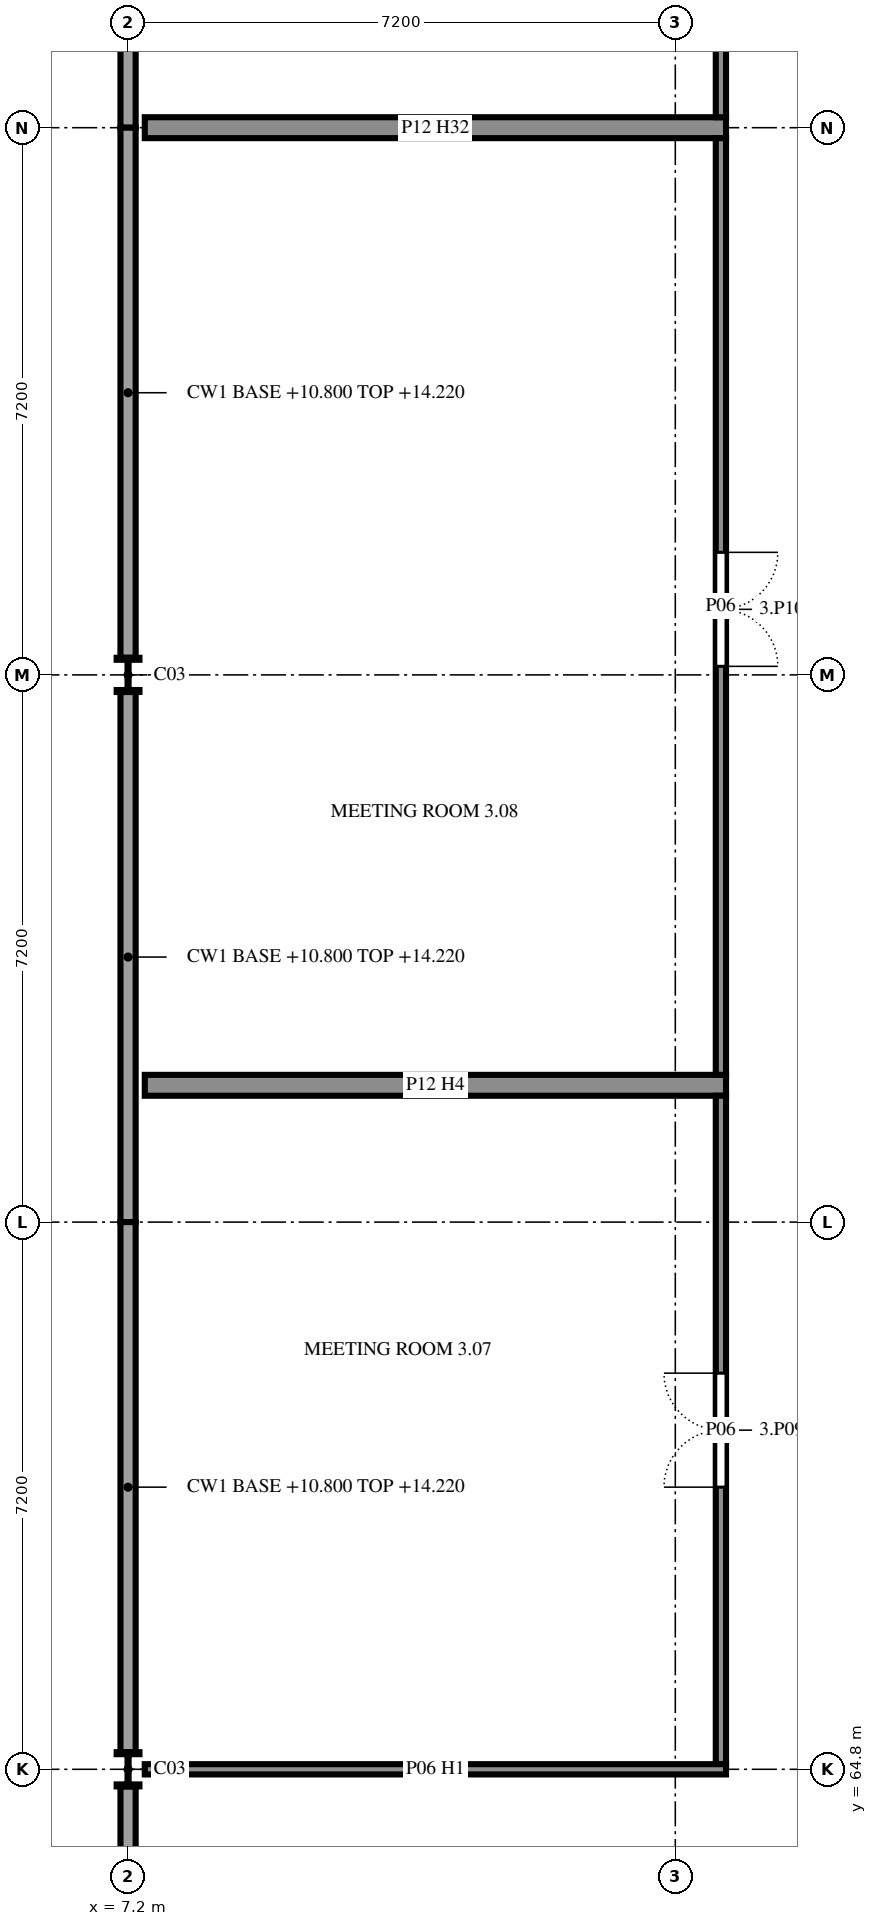
"""IFC4 building model, lengths in metres.
Left out: names, types, materials, properties, quantities, classifications, styles, units other than length and angle.
Written with IfcOpenShell. Run it as: python <this file> out.ifc"""

import sys

from ifc_helpers import new_model, si_unit, direction, frame, frame_2d, origin, origin_2d, place, context, subcontext, project, spatial, rectangle, i_section, extrude, element, fill, save


model = new_model("IFC4")
c1 = context("Model", 3, precision=1e-05, world=origin(), true_north=direction((0.0, 1.0)))
c2 = subcontext(c1, "Body", "Model", "MODEL_VIEW")
j1 = project(units=[si_unit("LENGTHUNIT", "METRE"), si_unit("PLANEANGLEUNIT", "RADIAN")], contexts=[c1])
p1 = place(None, origin())
s1 = spatial("IfcSite", under=j1, at=p1, CompositionType="ELEMENT")
p2 = place(p1, origin())
s2 = spatial("IfcBuilding", under=s1, at=p2, CompositionType="ELEMENT")
p3 = place(p2, frame((0.0, 0.0, 10.8)))
s3 = spatial("IfcBuildingStorey", under=s2, at=p3, CompositionType="ELEMENT", Elevation=10.8)
for number, where, z_axis, x_axis in (
    (1, (7.2, 64.8, 0.0), (0.0, 0.0, 1.0), (1.0, 0.0, 0.0)),
    (2, (7.2, 79.2, 0.0), (0.0, 0.0, 1.0), (1.0, 0.0, 0.0)),
):
    element("IfcColumn", number, at=place(p3, frame(where, z_axis=z_axis, x_axis=x_axis)), inside=s3, PredefinedType="COLUMN", context=c2, shape_type="SweptSolid", body=[
        extrude(i_section(OverallWidth=0.3, OverallDepth=0.45, WebThickness=0.014, FlangeThickness=0.026, FilletRadius=0.027, at=origin_2d()), origin(), (0.0, 0.0, 1.0), 3.6),
    ])
p4 = place(p3, frame((7.42, 73.8, 0.0), z_axis=(0.0, 0.0, 1.0), x_axis=(1.0, 0.0, 0.0)))
e3 = element("IfcWall", 3, at=p4, inside=s3, PredefinedType="PARTITIONING", context=c2, shape_type="SweptSolid", body=[
    extrude(rectangle(XDim=7.647, YDim=0.275, at=frame_2d((3.824, 0.0))), origin(), (0.0, 0.0, 1.0), 3.42),
])
p5 = place(p3, frame((15.0, 73.663, 0.0), z_axis=(0.0, 0.0, 1.0), x_axis=(0.0, -1.0, 0.0)))
e4 = element("IfcWall", 4, at=p5, inside=s3, PredefinedType="PARTITIONING", context=c2, shape_type="SweptSolid", body=[
    extrude(rectangle(XDim=8.795, YDim=0.135, at=frame_2d((4.397, 0.0))), origin(), (0.0, 0.0, 1.0), 3.42),
])
p6 = place(p5, frame((3.65, 0.0, 0.0)))
e5 = element("IfcOpeningElement", 5, at=p6, cuts=e4, PredefinedType="OPENING", context=c2, shape_type="SweptSolid", body=[
    extrude(rectangle(XDim=1.5, YDim=2.1, at=frame_2d((0.75, 1.05))), frame((0.0, 0.077, 0.0), z_axis=(0.0, -1.0, 0.0), x_axis=(1.0, 0.0, 0.0)), (0.0, 0.0, 1.0), 0.155),
])
p7 = place(p3, frame((15.067, 64.8, 0.0), z_axis=(0.0, 0.0, 1.0), x_axis=(-1.0, 0.0, 0.0)))
e6 = element("IfcWall", 6, at=p7, inside=s3, PredefinedType="PARTITIONING", context=c2, shape_type="SweptSolid", body=[
    extrude(rectangle(XDim=7.647, YDim=0.135, at=frame_2d((3.824, 0.0))), origin(), (0.0, 0.0, 1.0), 2.82),
])
p8 = place(p3, frame((7.42, 86.4, 0.0), z_axis=(0.0, 0.0, 1.0), x_axis=(1.0, 0.0, 0.0)))
e7 = element("IfcWall", 7, at=p8, inside=s3, PredefinedType="PARTITIONING", context=c2, shape_type="SweptSolid", body=[
    extrude(rectangle(XDim=7.647, YDim=0.275, at=frame_2d((3.824, 0.0))), origin(), (0.0, 0.0, 1.0), 2.97),
])
p9 = place(p3, frame((15.0, 86.262, 0.0), z_axis=(0.0, 0.0, 1.0), x_axis=(0.0, -1.0, 0.0)))
e8 = element("IfcWall", 8, at=p9, inside=s3, PredefinedType="PARTITIONING", context=c2, shape_type="SweptSolid", body=[
    extrude(rectangle(XDim=12.325, YDim=0.135, at=frame_2d((6.163, 0.0))), origin(), (0.0, 0.0, 1.0), 3.42),
])
p10 = place(p9, frame((5.45, 0.0, 0.0)))
e9 = element("IfcOpeningElement", 9, at=p10, cuts=e8, PredefinedType="OPENING", context=c2, shape_type="SweptSolid", body=[
    extrude(rectangle(XDim=1.5, YDim=2.1, at=frame_2d((0.75, 1.05))), frame((0.0, 0.077, 0.0), z_axis=(0.0, -1.0, 0.0), x_axis=(1.0, 0.0, 0.0)), (0.0, 0.0, 1.0), 0.155),
])
p11 = place(p3, frame((15.0, 98.863, 0.0), z_axis=(0.0, 0.0, 1.0), x_axis=(0.0, -1.0, 0.0)))
e10 = element("IfcWall", 10, at=p11, inside=s3, PredefinedType="PARTITIONING", context=c2, shape_type="SweptSolid", body=[
    extrude(rectangle(XDim=12.325, YDim=0.135, at=frame_2d((6.163, 0.0))), origin(), (0.0, 0.0, 1.0), 3.42),
])
p12 = place(p11, frame((5.45, 0.0, 0.0)))
e11 = element("IfcOpeningElement", 11, at=p12, cuts=e10, PredefinedType="OPENING", context=c2, shape_type="SweptSolid", body=[
    extrude(rectangle(XDim=1.5, YDim=2.1, at=frame_2d((0.75, 1.05))), frame((0.0, 0.077, 0.0), z_axis=(0.0, -1.0, 0.0), x_axis=(1.0, 0.0, 0.0)), (0.0, 0.0, 1.0), 0.155),
])
p13 = place(p6, frame((1.5, 0.0, 0.0), z_axis=(0.0, 0.0, 1.0), x_axis=(-1.0, 0.0, 0.0)))
e12 = element("IfcDoor", 12, at=p13, inside=s3, OperationType="DOUBLE_DOOR_SINGLE_SWING", PredefinedType="DOOR", context=c2, shape_type="SweptSolid", body=[
    extrude(rectangle(XDim=1.5, YDim=2.1, at=frame_2d((0.75, 1.05))), frame((0.0, 0.025, 0.0), z_axis=(0.0, -1.0, 0.0), x_axis=(1.0, 0.0, 0.0)), (0.0, 0.0, 1.0), 0.05),
])
fill(e5, e12)
p14 = place(p10, origin())
e13 = element("IfcDoor", 13, at=p14, inside=s3, OperationType="DOUBLE_DOOR_SINGLE_SWING", PredefinedType="DOOR", context=c2, shape_type="SweptSolid", body=[
    extrude(rectangle(XDim=1.5, YDim=2.1, at=frame_2d((0.75, 1.05))), frame((0.0, 0.025, 0.0), z_axis=(0.0, -1.0, 0.0), x_axis=(1.0, 0.0, 0.0)), (0.0, 0.0, 1.0), 0.05),
])
fill(e9, e13)
save(model, sys.argv[1])
